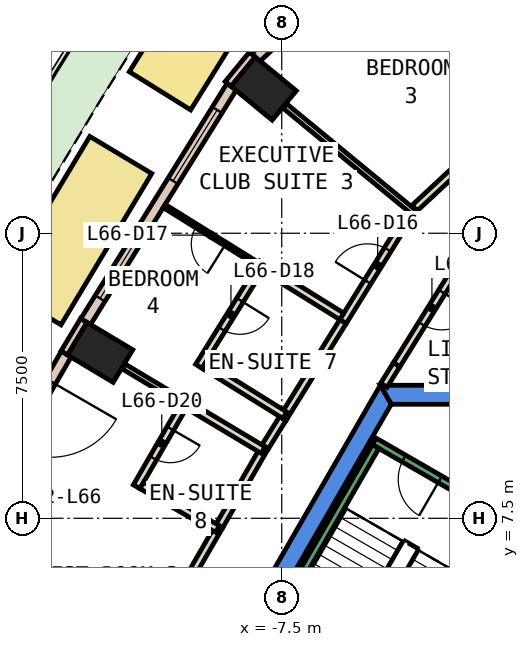
"""IFC4 building model, lengths in metres.
Left out: names, types, materials, properties, quantities, classifications, styles, units other than length and angle.
Written with IfcOpenShell. Run it as: python <this file> out.ifc"""

import sys

from ifc_helpers import new_model, si_unit, direction, frame, frame_2d, origin, origin_2d, place, context, subcontext, project, spatial, polyline, rectangle, outline, extrude, element, fill, save


model = new_model("IFC4")
c1 = context("Model", 3, precision=1e-05, world=origin(), true_north=direction((0.0, 1.0)))
c2 = subcontext(c1, "Body", "Model", "MODEL_VIEW")
j1 = project(units=[si_unit("LENGTHUNIT", "METRE"), si_unit("PLANEANGLEUNIT", "RADIAN")], contexts=[c1])
p1 = place(None, origin())
s1 = spatial("IfcSite", under=j1, at=p1, CompositionType="ELEMENT")
p2 = place(p1, origin())
s2 = spatial("IfcBuilding", under=s1, at=p2, CompositionType="ELEMENT")
p3 = place(p2, frame((0.0, 0.0, 286.4)))
s3 = spatial("IfcBuildingStorey", under=s2, at=p3, CompositionType="ELEMENT", Elevation=286.4)
for number, where, z_axis, x_axis in (
    (1, (-7.975, 18.807, 0.0), (0.0, 0.0, 1.0), (0.636, 0.772, 0.0)),
    (2, (-12.279, 11.865, 0.0), (0.0, 0.0, 1.0), (0.514, 0.858, 0.0)),
):
    element("IfcColumn", number, at=place(p3, frame(where, z_axis=z_axis, x_axis=x_axis)), inside=s3, PredefinedType="COLUMN", context=c2, shape_type="SweptSolid", body=[
        extrude(rectangle(XDim=1.0, YDim=1.4, at=origin_2d()), origin(), (0.0, 0.0, 1.0), 3.26),
    ])
p4 = place(p3, frame((0.0, 0.0, -0.6)))
e3 = element("IfcWall", 3, at=p4, inside=s3, PredefinedType="SHEAR", context=c2, shape_type="SweptSolid", body=[
    extrude(outline(polyline([(4.907, 11.0), (-4.907, 11.0), (-4.619, 10.5), (4.619, 10.5), (4.907, 11.0)])), origin(), (0.0, 0.0, 1.0), 3.86),
])
p5 = place(p3, frame((0.0, 0.0, -0.6)))
e4 = element("IfcWall", 4, at=p5, inside=s3, PredefinedType="SHEAR", context=c2, shape_type="SweptSolid", body=[
    extrude(outline(polyline([(-9.236, 3.502), (-8.803, 3.253), (-4.619, 10.5), (-4.907, 11.0), (-9.236, 3.502)])), origin(), (0.0, 0.0, 1.0), 3.86),
])
for number, where, z_axis, x_axis in (
    (5, (-8.275, 19.701, 0.0), (0.0, 0.0, 1.0), (-0.636, -0.772, 0.0)),
    (6, (-12.708, 12.706, 0.0), (0.0, 0.0, 1.0), (-0.514, -0.858, 0.0)),
):
    element("IfcWall", number, at=place(p3, frame(where, z_axis=z_axis, x_axis=x_axis)), inside=s3, PredefinedType="STANDARD", context=c2, shape_type="SweptSolid", body=[
        extrude(rectangle(XDim=1.0, YDim=0.2, at=frame_2d((0.5, 0.0))), origin(), (0.0, 0.0, 1.0), 3.26),
    ])
p6 = place(p3, frame((-5.241, 22.362, 0.0), z_axis=(0.0, 0.0, 1.0), x_axis=(-0.732397380344, -0.680877431896, 0.0)))
e7 = element("IfcWall", 7, at=p6, inside=s3, PredefinedType="STANDARD", context=c2, shape_type="SweptSolid", body=[
    extrude(rectangle(XDim=4.019, YDim=0.3, at=frame_2d((2.009, 0.0))), origin(), (0.0, 0.0, 1.0), 3.26),
])
p7 = place(p6, frame((1.309, 0.0, 0.9)))
e8 = element("IfcOpeningElement", 8, at=p7, cuts=e7, PredefinedType="OPENING", context=c2, shape_type="SweptSolid", body=[
    extrude(rectangle(XDim=1.4, YDim=2.0, at=frame_2d((0.7, 1.0))), frame((0.0, 0.16, 0.0), z_axis=(0.0, -1.0, 0.0), x_axis=(1.0, 0.0, 0.0)), (0.0, 0.0, 1.0), 0.32),
])
p8 = place(p3, frame((-8.819, 18.855, 0.0), z_axis=(0.0, 0.0, 1.0), x_axis=(-0.527762071678, -0.849392250788, 0.0)))
e9 = element("IfcWall", 9, at=p8, inside=s3, PredefinedType="STANDARD", context=c2, shape_type="SweptSolid", body=[
    extrude(rectangle(XDim=7.276, YDim=0.3, at=frame_2d((3.638, 0.0))), origin(), (0.0, 0.0, 1.0), 3.26),
])
p9 = place(p8, frame((0.719, 0.0, 0.9)))
e10 = element("IfcOpeningElement", 10, at=p9, cuts=e9, PredefinedType="OPENING", context=c2, shape_type="SweptSolid", body=[
    extrude(rectangle(XDim=2.2, YDim=2.0, at=frame_2d((1.1, 1.0))), frame((0.0, 0.16, 0.0), z_axis=(0.0, -1.0, 0.0), x_axis=(1.0, 0.0, 0.0)), (0.0, 0.0, 1.0), 0.32),
])
p10 = place(p8, frame((4.357, 0.0, 0.9)))
e11 = element("IfcOpeningElement", 11, at=p10, cuts=e9, PredefinedType="OPENING", context=c2, shape_type="SweptSolid", body=[
    extrude(rectangle(XDim=2.2, YDim=2.0, at=frame_2d((1.1, 1.0))), frame((0.0, 0.16, 0.0), z_axis=(0.0, -1.0, 0.0), x_axis=(1.0, 0.0, 0.0)), (0.0, 0.0, 1.0), 0.32),
])
p11 = place(p3, frame((-13.172, 11.819, 0.0), z_axis=(0.0, 0.0, 1.0), x_axis=(-0.499945412946, -0.866056917341, 0.0)))
e12 = element("IfcWall", 12, at=p11, inside=s3, PredefinedType="STANDARD", context=c2, shape_type="SweptSolid", body=[
    extrude(rectangle(XDim=7.299, YDim=0.3, at=frame_2d((3.649, 0.0))), origin(), (0.0, 0.0, 1.0), 3.26),
])
p12 = place(p11, frame((0.825, 0.0, 0.0)))
e13 = element("IfcOpeningElement", 13, at=p12, cuts=e12, PredefinedType="OPENING", context=c2, shape_type="SweptSolid", body=[
    extrude(rectangle(XDim=2.0, YDim=2.4, at=frame_2d((1.0, 1.2))), frame((0.0, 0.16, 0.0), z_axis=(0.0, -1.0, 0.0), x_axis=(1.0, 0.0, 0.0)), (0.0, 0.0, 1.0), 0.32),
])
p13 = place(p11, frame((4.374, 0.0, 0.9)))
e14 = element("IfcOpeningElement", 14, at=p13, cuts=e12, PredefinedType="OPENING", context=c2, shape_type="SweptSolid", body=[
    extrude(rectangle(XDim=2.2, YDim=2.0, at=frame_2d((1.1, 1.0))), frame((0.0, 0.16, 0.0), z_axis=(0.0, -1.0, 0.0), x_axis=(1.0, 0.0, 0.0)), (0.0, 0.0, 1.0), 0.32),
])
p14 = place(p3, frame((-8.167, 22.821, 0.0), z_axis=(0.0, 0.0, 1.0), x_axis=(-0.528631074262, -0.848851687472, 0.0)))
e15 = element("IfcWall", 15, at=p14, inside=s3, PredefinedType="STANDARD", context=c2, shape_type="SweptSolid", body=[
    extrude(rectangle(XDim=4.799, YDim=1.9, at=frame_2d((2.4, 0.0))), origin(), (0.0, 0.0, 1.0), 0.8),
])
p15 = place(p3, frame((-11.736, 17.059, 0.0), z_axis=(0.0, 0.0, 1.0), x_axis=(-0.514333285091, -0.857590386984, 0.0)))
e16 = element("IfcWall", 16, at=p15, inside=s3, PredefinedType="STANDARD", context=c2, shape_type="SweptSolid", body=[
    extrude(rectangle(XDim=4.641, YDim=1.9, at=frame_2d((2.32, 0.0))), origin(), (0.0, 0.0, 1.0), 0.8),
])
p16 = place(p3, frame((-2.62, 14.526, 0.0), z_axis=(0.0, 0.0, 1.0), x_axis=(-0.527787942423, -0.849376175692, 0.0)))
e17 = element("IfcWall", 17, at=p16, inside=s3, PredefinedType="PARTITIONING", context=c2, shape_type="SweptSolid", body=[
    extrude(rectangle(XDim=3.517, YDim=0.2, at=frame_2d((1.758, 0.0))), origin(), (0.0, 0.0, 1.0), 3.26),
])
p17 = place(p16, frame((1.258, 0.0, 0.0)))
e18 = element("IfcOpeningElement", 18, at=p17, cuts=e17, PredefinedType="OPENING", context=c2, shape_type="SweptSolid", body=[
    extrude(rectangle(XDim=1.0, YDim=2.1, at=frame_2d((0.5, 1.05))), frame((0.0, 0.11, 0.0), z_axis=(0.0, -1.0, 0.0), x_axis=(1.0, 0.0, 0.0)), (0.0, 0.0, 1.0), 0.22),
])
p18 = place(p3, frame((-4.478, 11.54, 0.0), z_axis=(0.0, 0.0, 1.0), x_axis=(-0.527362861778, -0.849640166198, 0.0)))
e19 = element("IfcWall", 19, at=p18, inside=s3, PredefinedType="PARTITIONING", context=c2, shape_type="SweptSolid", body=[
    extrude(rectangle(XDim=0.633, YDim=0.2, at=frame_2d((0.317, 0.0))), origin(), (0.0, 0.0, 1.0), 3.26),
])
p19 = place(p3, frame((-4.002, 15.663, 0.0), z_axis=(0.0, 0.0, 1.0), x_axis=(0.732331154554, 0.680948661846, 0.0)))
e20 = element("IfcWall", 20, at=p19, inside=s3, PredefinedType="PARTITIONING", context=c2, shape_type="SweptSolid", body=[
    extrude(rectangle(XDim=2.803, YDim=0.2, at=frame_2d((1.402, 0.0))), origin(), (0.0, 0.0, 1.0), 3.26),
])
p20 = place(p3, frame((-5.889, 12.675, 0.0), z_axis=(0.0, 0.0, 1.0), x_axis=(0.527550626699, 0.849523593709, 0.0)))
e21 = element("IfcWall", 21, at=p20, inside=s3, PredefinedType="PARTITIONING", context=c2, shape_type="SweptSolid", body=[
    extrude(rectangle(XDim=3.463, YDim=0.2, at=frame_2d((1.731, 0.0))), origin(), (0.0, 0.0, 1.0), 3.26),
])
p21 = place(p20, frame((1.231, 0.0, 0.0)))
e22 = element("IfcOpeningElement", 22, at=p21, cuts=e21, PredefinedType="OPENING", context=c2, shape_type="SweptSolid", body=[
    extrude(rectangle(XDim=1.0, YDim=2.1, at=frame_2d((0.5, 1.05))), frame((0.0, 0.11, 0.0), z_axis=(0.0, -1.0, 0.0), x_axis=(1.0, 0.0, 0.0)), (0.0, 0.0, 1.0), 0.22),
])
p22 = place(p3, frame((-7.937, 9.38, 0.0), z_axis=(0.0, 0.0, 1.0), x_axis=(0.52850186976, 0.848932137252, 0.0)))
e23 = element("IfcWall", 23, at=p22, inside=s3, PredefinedType="PARTITIONING", context=c2, shape_type="SweptSolid", body=[
    extrude(rectangle(XDim=0.88, YDim=0.2, at=frame_2d((0.44, 0.0))), origin(), (0.0, 0.0, 1.0), 3.26),
])
p23 = place(p3, frame((-7.472, 10.127, 0.0), z_axis=(0.0, 0.0, 1.0), x_axis=(0.527707224705, 0.849426326996, 0.0)))
e24 = element("IfcWall", 24, at=p23, inside=s3, PredefinedType="PARTITIONING", context=c2, shape_type="SweptSolid", body=[
    extrude(rectangle(XDim=3.0, YDim=0.2, at=frame_2d((1.5, 0.0))), origin(), (0.0, 0.0, 1.0), 3.26),
])
p24 = place(p3, frame((-12.082, 2.207, 0.0), z_axis=(0.0, 0.0, 1.0), x_axis=(0.500123454404, 0.865954115618, 0.0)))
e25 = element("IfcWall", 25, at=p24, inside=s3, PredefinedType="PARTITIONING", context=c2, shape_type="SweptSolid", body=[
    extrude(rectangle(XDim=5.885, YDim=0.2, at=frame_2d((2.942, 0.0))), origin(), (0.0, 0.0, 1.0), 3.26),
])
p25 = place(p24, frame((2.493, 0.0, 0.0)))
e26 = element("IfcOpeningElement", 26, at=p25, cuts=e25, PredefinedType="OPENING", context=c2, shape_type="SweptSolid", body=[
    extrude(rectangle(XDim=1.0, YDim=2.1, at=frame_2d((0.5, 1.05))), frame((0.0, 0.11, 0.0), z_axis=(0.0, -1.0, 0.0), x_axis=(1.0, 0.0, 0.0)), (0.0, 0.0, 1.0), 0.22),
])
p26 = place(p3, frame((-9.139, 7.303, 0.0), z_axis=(0.0, 0.0, 1.0), x_axis=(0.499869187296, 0.866100915363, 0.0)))
e27 = element("IfcWall", 27, at=p26, inside=s3, PredefinedType="PARTITIONING", context=c2, shape_type="SweptSolid", body=[
    extrude(rectangle(XDim=2.401, YDim=0.2, at=frame_2d((1.2, 0.0))), origin(), (0.0, 0.0, 1.0), 3.26),
])
p27 = place(p3, frame((-3.998, 15.532, 0.0), z_axis=(0.0, 0.0, 1.0), x_axis=(-0.771938186867, 0.635697597649, 0.0)))
e28 = element("IfcWall", 28, at=p27, inside=s3, PredefinedType="PARTITIONING", context=c2, shape_type="SweptSolid", body=[
    extrude(rectangle(XDim=4.432, YDim=0.15, at=frame_2d((2.216, 0.0))), origin(), (0.0, 0.0, 1.0), 3.26),
])
p28 = place(p3, frame((-8.13, 14.185, 0.0), z_axis=(0.0, 0.0, 1.0), x_axis=(-0.849305726881, 0.527901299759, 0.0)))
e29 = element("IfcWall", 29, at=p28, inside=s3, PredefinedType="PARTITIONING", context=c2, shape_type="SweptSolid", body=[
    extrude(rectangle(XDim=2.9, YDim=0.1, at=frame_2d((1.45, 0.0))), origin(), (0.0, 0.0, 1.0), 3.26),
])
p29 = place(p28, frame((1.0, 0.0, 0.0)))
e30 = element("IfcOpeningElement", 30, at=p29, cuts=e29, PredefinedType="OPENING", context=c2, shape_type="SweptSolid", body=[
    extrude(rectangle(XDim=0.9, YDim=2.1, at=frame_2d((0.45, 1.05))), frame((0.0, 0.06, 0.0), z_axis=(0.0, -1.0, 0.0), x_axis=(1.0, 0.0, 0.0)), (0.0, 0.0, 1.0), 0.12),
])
p30 = place(p3, frame((-5.921, 12.813, 0.0), z_axis=(0.0, 0.0, 1.0), x_axis=(-0.849366650736, 0.527803270752, 0.0)))
e31 = element("IfcWall", 31, at=p30, inside=s3, PredefinedType="PARTITIONING", context=c2, shape_type="SweptSolid", body=[
    extrude(rectangle(XDim=2.401, YDim=0.2, at=frame_2d((1.2, 0.0))), origin(), (0.0, 0.0, 1.0), 3.26),
])
p31 = place(p3, frame((-7.992, 14.217, 0.0), z_axis=(0.0, 0.0, 1.0), x_axis=(-0.527795797674, -0.849371294522, 0.0)))
e32 = element("IfcWall", 32, at=p31, inside=s3, PredefinedType="PARTITIONING", context=c2, shape_type="SweptSolid", body=[
    extrude(rectangle(XDim=3.2, YDim=0.2, at=frame_2d((1.6, 0.0))), origin(), (0.0, 0.0, 1.0), 3.26),
])
p32 = place(p31, frame((1.15, 0.0, 0.0)))
e33 = element("IfcOpeningElement", 33, at=p32, cuts=e32, PredefinedType="OPENING", context=c2, shape_type="SweptSolid", body=[
    extrude(rectangle(XDim=0.9, YDim=2.1, at=frame_2d((0.45, 1.05))), frame((0.0, 0.11, 0.0), z_axis=(0.0, -1.0, 0.0), x_axis=(1.0, 0.0, 0.0)), (0.0, 0.0, 1.0), 0.22),
])
p33 = place(p3, frame((-9.543, 11.531, 0.0), z_axis=(0.0, 0.0, 1.0), x_axis=(0.849400119549, -0.527749407305, 0.0)))
e34 = element("IfcWall", 34, at=p33, inside=s3, PredefinedType="PARTITIONING", context=c2, shape_type="SweptSolid", body=[
    extrude(rectangle(XDim=2.5, YDim=0.2, at=frame_2d((1.25, 0.0))), origin(), (0.0, 0.0, 1.0), 3.26),
])
p34 = place(p3, frame((-10.133, 10.58, 0.0), z_axis=(0.0, 0.0, 1.0), x_axis=(-0.857903919212, 0.513810145287, 0.0)))
e35 = element("IfcWall", 35, at=p34, inside=s3, PredefinedType="PARTITIONING", context=c2, shape_type="SweptSolid", body=[
    extrude(rectangle(XDim=1.781, YDim=0.15, at=frame_2d((0.891, 0.0))), origin(), (0.0, 0.0, 1.0), 3.26),
])
p35 = place(p3, frame((-7.989, 9.295, 0.0), z_axis=(0.0, 0.0, 1.0), x_axis=(-0.857801856135, 0.513980520654, 0.0)))
e36 = element("IfcWall", 36, at=p35, inside=s3, PredefinedType="PARTITIONING", context=c2, shape_type="SweptSolid", body=[
    extrude(rectangle(XDim=2.3, YDim=0.2, at=frame_2d((1.15, 0.0))), origin(), (0.0, 0.0, 1.0), 3.26),
])
p36 = place(p3, frame((-9.997, 10.615, 0.0), z_axis=(0.0, 0.0, 1.0), x_axis=(-0.500525697837, -0.865721679182, 0.0)))
e37 = element("IfcWall", 37, at=p36, inside=s3, PredefinedType="PARTITIONING", context=c2, shape_type="SweptSolid", body=[
    extrude(rectangle(XDim=2.639, YDim=0.2, at=frame_2d((1.32, 0.0))), origin(), (0.0, 0.0, 1.0), 3.26),
])
p37 = place(p36, frame((0.869, 0.0, 0.0)))
e38 = element("IfcOpeningElement", 38, at=p37, cuts=e37, PredefinedType="OPENING", context=c2, shape_type="SweptSolid", body=[
    extrude(rectangle(XDim=0.9, YDim=2.1, at=frame_2d((0.45, 1.05))), frame((0.0, 0.11, 0.0), z_axis=(0.0, -1.0, 0.0), x_axis=(1.0, 0.0, 0.0)), (0.0, 0.0, 1.0), 0.22),
])
p38 = place(p3, frame((-11.181, 8.367, 0.0), z_axis=(0.0, 0.0, 1.0), x_axis=(0.866053019151, -0.499952165731, 0.0)))
e39 = element("IfcWall", 39, at=p38, inside=s3, PredefinedType="PARTITIONING", context=c2, shape_type="SweptSolid", body=[
    extrude(rectangle(XDim=2.3, YDim=0.2, at=frame_2d((1.15, 0.0))), origin(), (0.0, 0.0, 1.0), 3.26),
])
p39 = place(p3, frame((-1.256, 7.324, 0.0), z_axis=(0.0, 0.0, 1.0), x_axis=(-0.866046073146, 0.499964197906, 0.0)))
e40 = element("IfcWall", 40, at=p39, inside=s3, PredefinedType="STANDARD", context=c2, shape_type="SweptSolid", body=[
    extrude(rectangle(XDim=4.4, YDim=0.2, at=frame_2d((2.2, 0.0))), origin(), (0.0, 0.0, 1.0), 3.26),
])
p40 = place(p39, frame((2.4, 0.0, 0.0)))
e41 = element("IfcOpeningElement", 41, at=p40, cuts=e40, PredefinedType="OPENING", context=c2, shape_type="SweptSolid", body=[
    extrude(rectangle(XDim=1.1, YDim=2.2, at=frame_2d((0.55, 1.1))), frame((0.0, 0.11, 0.0), z_axis=(0.0, -1.0, 0.0), x_axis=(1.0, 0.0, 0.0)), (0.0, 0.0, 1.0), 0.22),
])
p41 = place(p3, frame((-1.393, 7.288, 0.0), z_axis=(0.0, 0.0, 1.0), x_axis=(-0.499963383562, -0.866046543262, 0.0)))
e42 = element("IfcWall", 42, at=p41, inside=s3, PredefinedType="STANDARD", context=c2, shape_type="SweptSolid", body=[
    extrude(rectangle(XDim=6.9, YDim=0.2, at=frame_2d((3.45, 0.0))), origin(), (0.0, 0.0, 1.0), 3.26),
])
p42 = place(p41, frame((0.45, 0.0, 0.0)))
e43 = element("IfcOpeningElement", 43, at=p42, cuts=e42, PredefinedType="OPENING", context=c2, shape_type="SweptSolid", body=[
    extrude(rectangle(XDim=1.1, YDim=2.2, at=frame_2d((0.55, 1.1))), frame((0.0, 0.11, 0.0), z_axis=(0.0, -1.0, 0.0), x_axis=(1.0, 0.0, 0.0)), (0.0, 0.0, 1.0), 0.22),
])
p43 = place(p3, frame((-5.03, 9.388, 0.0), z_axis=(0.0, 0.0, 1.0), x_axis=(-0.499978703459, -0.866037698999, 0.0)))
e44 = element("IfcWall", 44, at=p43, inside=s3, PredefinedType="STANDARD", context=c2, shape_type="SweptSolid", body=[
    extrude(rectangle(XDim=6.9, YDim=0.2, at=frame_2d((3.45, 0.0))), origin(), (0.0, 0.0, 1.0), 3.26),
])
p44 = place(p9, origin())
e45 = element("IfcWindow", 45, at=p44, inside=s3, PartitioningType="SINGLE_PANEL", PredefinedType="WINDOW", context=c2, shape_type="SweptSolid", body=[
    extrude(rectangle(XDim=2.2, YDim=2.0, at=frame_2d((1.1, 1.0))), frame((0.0, 0.03, 0.0), z_axis=(0.0, -1.0, 0.0), x_axis=(1.0, 0.0, 0.0)), (0.0, 0.0, 1.0), 0.06),
])
fill(e10, e45)
p45 = place(p10, origin())
e46 = element("IfcWindow", 46, at=p45, inside=s3, PartitioningType="SINGLE_PANEL", PredefinedType="WINDOW", context=c2, shape_type="SweptSolid", body=[
    extrude(rectangle(XDim=2.2, YDim=2.0, at=frame_2d((1.1, 1.0))), frame((0.0, 0.03, 0.0), z_axis=(0.0, -1.0, 0.0), x_axis=(1.0, 0.0, 0.0)), (0.0, 0.0, 1.0), 0.06),
])
fill(e11, e46)
p46 = place(p21, origin())
e47 = element("IfcDoor", 47, at=p46, inside=s3, OperationType="SINGLE_SWING_LEFT", PredefinedType="DOOR", context=c2, shape_type="SweptSolid", body=[
    extrude(rectangle(XDim=1.0, YDim=2.1, at=frame_2d((0.5, 1.05))), frame((0.0, 0.025, 0.0), z_axis=(0.0, -1.0, 0.0), x_axis=(1.0, 0.0, 0.0)), (0.0, 0.0, 1.0), 0.05),
])
fill(e22, e47)
p47 = place(p29, origin())
e48 = element("IfcDoor", 48, at=p47, inside=s3, OperationType="SINGLE_SWING_LEFT", PredefinedType="DOOR", context=c2, shape_type="SweptSolid", body=[
    extrude(rectangle(XDim=0.9, YDim=2.1, at=frame_2d((0.45, 1.05))), frame((0.0, 0.025, 0.0), z_axis=(0.0, -1.0, 0.0), x_axis=(1.0, 0.0, 0.0)), (0.0, 0.0, 1.0), 0.05),
])
fill(e30, e48)
p48 = place(p32, origin())
e49 = element("IfcDoor", 49, at=p48, inside=s3, OperationType="SINGLE_SWING_LEFT", PredefinedType="DOOR", context=c2, shape_type="SweptSolid", body=[
    extrude(rectangle(XDim=0.9, YDim=2.1, at=frame_2d((0.45, 1.05))), frame((0.0, 0.025, 0.0), z_axis=(0.0, -1.0, 0.0), x_axis=(1.0, 0.0, 0.0)), (0.0, 0.0, 1.0), 0.05),
])
fill(e33, e49)
p49 = place(p37, origin())
e50 = element("IfcDoor", 50, at=p49, inside=s3, OperationType="SINGLE_SWING_LEFT", PredefinedType="DOOR", context=c2, shape_type="SweptSolid", body=[
    extrude(rectangle(XDim=0.9, YDim=2.1, at=frame_2d((0.45, 1.05))), frame((0.0, 0.025, 0.0), z_axis=(0.0, -1.0, 0.0), x_axis=(1.0, 0.0, 0.0)), (0.0, 0.0, 1.0), 0.05),
])
fill(e38, e50)
p50 = place(p17, origin())
e51 = element("IfcDoor", 51, at=p50, inside=s3, OperationType="SINGLE_SWING_RIGHT", PredefinedType="DOOR", context=c2, shape_type="SweptSolid", body=[
    extrude(rectangle(XDim=1.0, YDim=2.1, at=frame_2d((0.5, 1.05))), frame((0.0, 0.025, 0.0), z_axis=(0.0, -1.0, 0.0), x_axis=(1.0, 0.0, 0.0)), (0.0, 0.0, 1.0), 0.05),
])
fill(e18, e51)
p51 = place(p40, origin())
e52 = element("IfcDoor", 52, at=p51, inside=s3, OperationType="SINGLE_SWING_LEFT", PredefinedType="DOOR", context=c2, shape_type="SweptSolid", body=[
    extrude(rectangle(XDim=1.1, YDim=2.2, at=frame_2d((0.55, 1.1))), frame((0.0, 0.025, 0.0), z_axis=(0.0, -1.0, 0.0), x_axis=(1.0, 0.0, 0.0)), (0.0, 0.0, 1.0), 0.05),
])
fill(e41, e52)
save(model, sys.argv[1])
